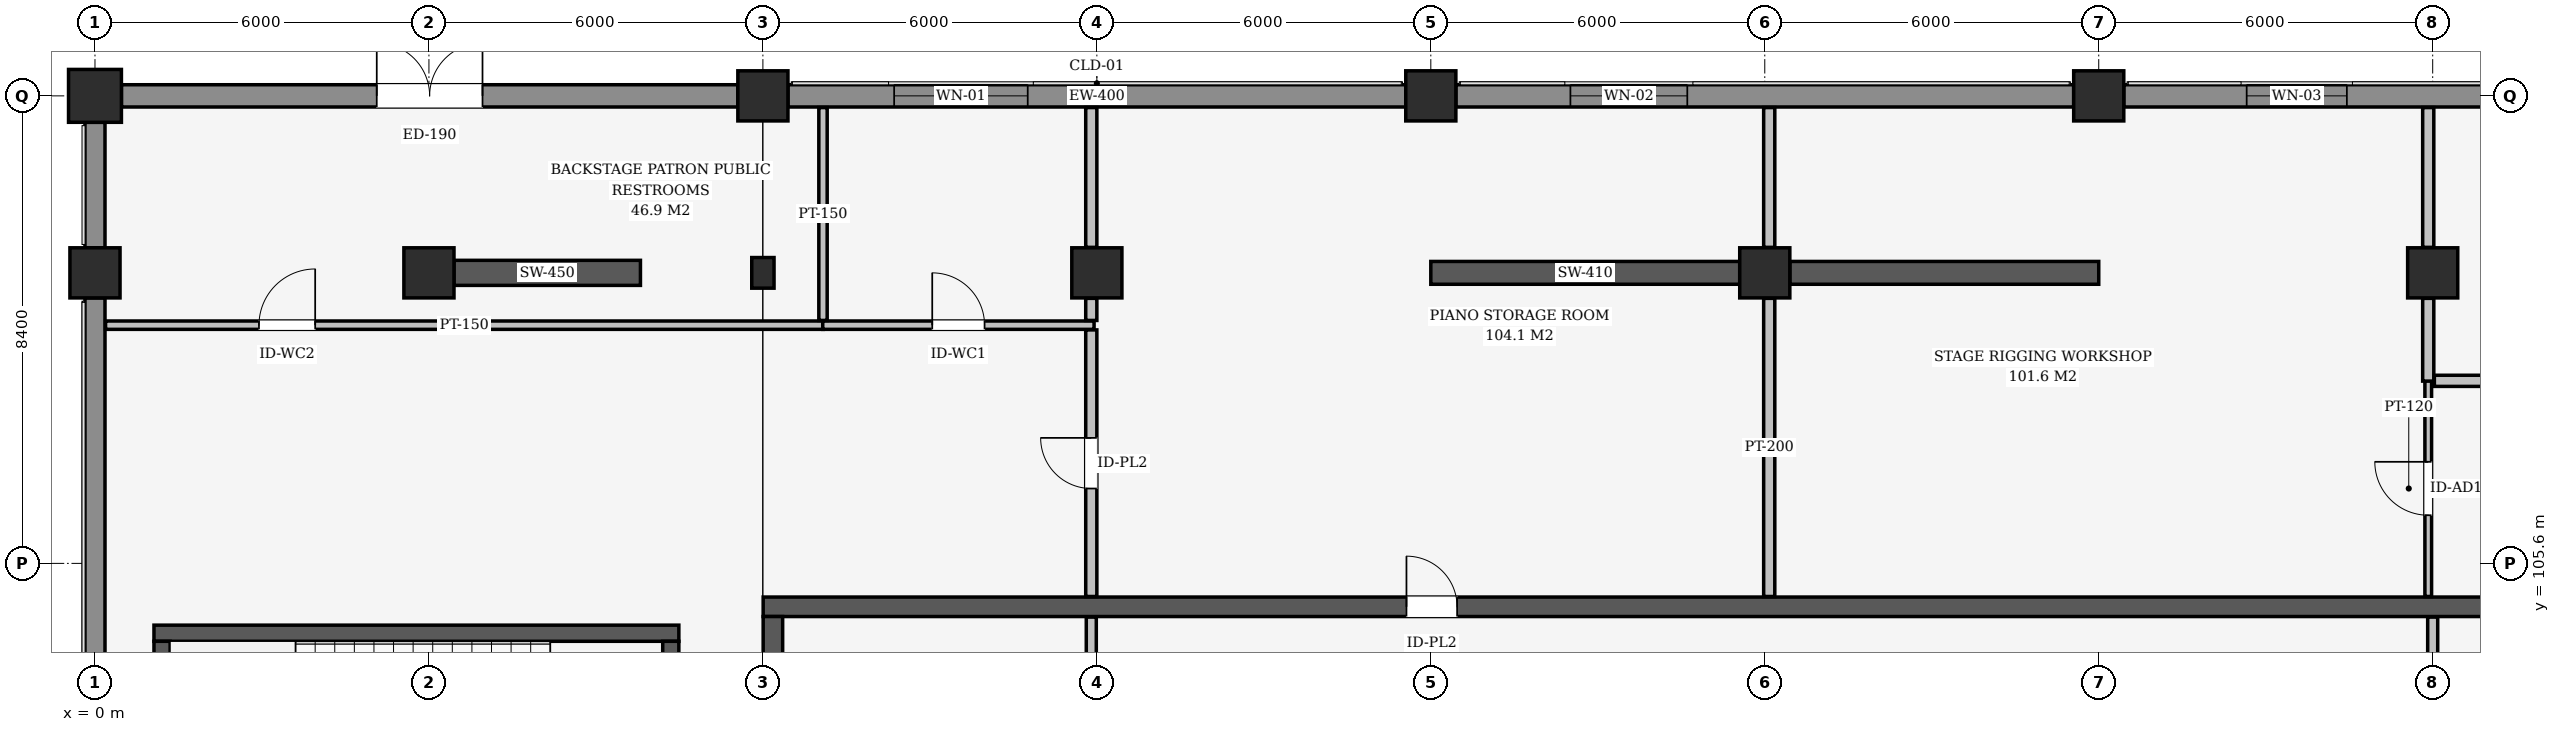
"""IFC4 building model, lengths in metres.
Left out: names, types, materials, properties, quantities, classifications, styles, units other than length and angle.
Written with IfcOpenShell. Run it as: python <this file> out.ifc"""

import sys

from ifc_helpers import new_model, si_unit, direction, frame, frame_2d, origin, origin_2d, place, context, subcontext, project, spatial, rectangle, extrude, element, fill, save


model = new_model("IFC4")
c1 = context("Model", 3, precision=1e-05, world=origin(), true_north=direction((0.0, 1.0)))
c2 = subcontext(c1, "Body", "Model", "MODEL_VIEW")
j1 = project(units=[si_unit("LENGTHUNIT", "METRE"), si_unit("PLANEANGLEUNIT", "RADIAN")], contexts=[c1])
p1 = place(None, origin())
s1 = spatial("IfcSite", under=j1, at=p1, CompositionType="ELEMENT")
p2 = place(p1, origin())
s2 = spatial("IfcBuilding", under=s1, at=p2, CompositionType="ELEMENT")
p3 = place(p2, origin())
s3 = spatial("IfcBuildingStorey", under=s2, at=p3, CompositionType="ELEMENT", Elevation=0.0)
p4 = place(p3, frame((0.0, 114.0, 0.0), z_axis=(0.0, 0.0, 1.0), x_axis=(1.0, 0.0, 0.0)))
e1 = element("IfcColumn", 1, at=p4, inside=s3, PredefinedType="COLUMN", context=c2, shape_type="SweptSolid", body=[
    extrude(rectangle(XDim=0.95, YDim=0.95, at=origin_2d()), origin(), (0.0, 0.0, 1.0), 4.8),
])
for number, where, z_axis, x_axis in (
    (2, (12.0, 114.0, 0.0), (0.0, 0.0, 1.0), (1.0, 0.0, 0.0)),
    (3, (24.0, 114.0, 0.0), (0.0, 0.0, 1.0), (1.0, 0.0, 0.0)),
    (4, (36.0, 114.0, 0.0), (0.0, 0.0, 1.0), (1.0, 0.0, 0.0)),
    (5, (0.0, 110.82, 0.0), (0.0, 0.0, 1.0), (1.0, 0.0, 0.0)),
    (6, (6.0, 110.82, 0.0), (0.0, 0.0, 1.0), (1.0, 0.0, 0.0)),
    (7, (18.0, 110.82, 0.0), (0.0, 0.0, 1.0), (1.0, 0.0, 0.0)),
    (8, (30.0, 110.82, 0.0), (0.0, 0.0, 1.0), (1.0, 0.0, 0.0)),
    (9, (42.0, 110.82, 0.0), (0.0, 0.0, 1.0), (1.0, 0.0, 0.0)),
):
    element("IfcColumn", number, at=place(p3, frame(where, z_axis=z_axis, x_axis=x_axis)), inside=s3, PredefinedType="COLUMN", context=c2, shape_type="SweptSolid", body=[
        extrude(rectangle(XDim=0.9, YDim=0.9, at=origin_2d()), origin(), (0.0, 0.0, 1.0), 4.8),
    ])
p5 = place(p3, frame((12.0, 110.82, 0.0), z_axis=(0.0, 0.0, 1.0), x_axis=(1.0, 0.0, 0.0)))
e10 = element("IfcColumn", 10, at=p5, inside=s3, PredefinedType="PILASTER", context=c2, shape_type="SweptSolid", body=[
    extrude(rectangle(XDim=0.4, YDim=0.55, at=origin_2d()), origin(), (0.0, 0.0, 1.0), 4.8),
])
p6 = place(p3, frame((12.005, 104.82, 0.0), z_axis=(0.0, 0.0, 1.0), x_axis=(1.0, 0.0, 0.0)))
e11 = element("IfcWall", 11, at=p6, inside=s3, PredefinedType="SHEAR", context=c2, shape_type="SweptSolid", body=[
    extrude(rectangle(XDim=35.99, YDim=0.35, at=frame_2d((17.995, 0.0))), origin(), (0.0, 0.0, 1.0), 4.5),
])
p7 = place(p6, frame((11.558, 0.0, 0.0)))
e12 = element("IfcOpeningElement", 12, at=p7, cuts=e11, PredefinedType="OPENING", context=c2, shape_type="SweptSolid", body=[
    extrude(rectangle(XDim=0.91, YDim=2.1, at=frame_2d((0.455, 1.05))), frame((0.0, 0.185, 0.0), z_axis=(0.0, -1.0, 0.0), x_axis=(1.0, 0.0, 0.0)), (0.0, 0.0, 1.0), 0.37),
])
p8 = place(p3, frame((12.18, 74.755, 0.0), z_axis=(0.0, 0.0, 1.0), x_axis=(0.0, 1.0, 0.0)))
e13 = element("IfcWall", 13, at=p8, inside=s3, PredefinedType="SHEAR", context=c2, shape_type="SweptSolid", body=[
    extrude(rectangle(XDim=29.89, YDim=0.35, at=frame_2d((14.945, 0.0))), origin(), (0.0, 0.0, 1.0), 4.5),
])
p9 = place(p3, frame((6.45, 110.82, 0.0), z_axis=(0.0, 0.0, 1.0), x_axis=(1.0, 0.0, 0.0)))
e14 = element("IfcWall", 14, at=p9, inside=s3, PredefinedType="SHEAR", context=c2, shape_type="SweptSolid", body=[
    extrude(rectangle(XDim=3.35, YDim=0.45, at=frame_2d((1.675, 0.0))), origin(), (0.0, 0.0, 1.0), 3.805),
])
for number, where, z_axis, x_axis in (
    (15, (24.0, 110.82, 0.0), (0.0, 0.0, 1.0), (1.0, 0.0, 0.0)),
    (16, (30.45, 110.82, 0.0), (0.0, 0.0, 1.0), (1.0, 0.0, 0.0)),
):
    element("IfcWall", number, at=place(p3, frame(where, z_axis=z_axis, x_axis=x_axis)), inside=s3, PredefinedType="SHEAR", context=c2, shape_type="SweptSolid", body=[
        extrude(rectangle(XDim=5.55, YDim=0.41, at=frame_2d((2.775, 0.0))), origin(), (0.0, 0.0, 1.0), 3.805),
    ])
p10 = place(p3, frame((0.475, 114.0, 0.0), z_axis=(0.0, 0.0, 1.0), x_axis=(1.0, 0.0, 0.0)))
e17 = element("IfcWall", 17, at=p10, inside=s3, PredefinedType="SOLIDWALL", context=c2, shape_type="SweptSolid", body=[
    extrude(rectangle(XDim=11.075, YDim=0.4, at=frame_2d((5.538, 0.0))), origin(), (0.0, 0.0, 1.0), 3.787),
])
p11 = place(p10, frame((4.587, 0.0, 0.0)))
e18 = element("IfcOpeningElement", 18, at=p11, cuts=e17, PredefinedType="OPENING", context=c2, shape_type="SweptSolid", body=[
    extrude(rectangle(XDim=1.9, YDim=2.35, at=frame_2d((0.95, 1.175))), frame((0.0, 0.21, 0.0), z_axis=(0.0, -1.0, 0.0), x_axis=(1.0, 0.0, 0.0)), (0.0, 0.0, 1.0), 0.42),
])
p12 = place(p3, frame((12.45, 114.0, 0.0), z_axis=(0.0, 0.0, 1.0), x_axis=(1.0, 0.0, 0.0)))
e19 = element("IfcWall", 19, at=p12, inside=s3, PredefinedType="SOLIDWALL", context=c2, shape_type="SweptSolid", body=[
    extrude(rectangle(XDim=11.1, YDim=0.4, at=frame_2d((5.55, 0.0))), origin(), (0.0, 0.0, 1.0), 3.787),
])
p13 = place(p12, frame((1.908, 0.0, 0.85)))
e20 = element("IfcOpeningElement", 20, at=p13, cuts=e19, PredefinedType="OPENING", context=c2, shape_type="SweptSolid", body=[
    extrude(rectangle(XDim=2.4, YDim=1.8, at=frame_2d((1.2, 0.9))), frame((0.0, 0.21, 0.0), z_axis=(0.0, -1.0, 0.0), x_axis=(1.0, 0.0, 0.0)), (0.0, 0.0, 1.0), 0.42),
])
p14 = place(p3, frame((24.45, 114.0, 0.0), z_axis=(0.0, 0.0, 1.0), x_axis=(1.0, 0.0, 0.0)))
e21 = element("IfcWall", 21, at=p14, inside=s3, PredefinedType="SOLIDWALL", context=c2, shape_type="SweptSolid", body=[
    extrude(rectangle(XDim=11.1, YDim=0.4, at=frame_2d((5.55, 0.0))), origin(), (0.0, 0.0, 1.0), 3.787),
])
p15 = place(p14, frame((2.058, 0.0, 0.85)))
e22 = element("IfcOpeningElement", 22, at=p15, cuts=e21, PredefinedType="OPENING", context=c2, shape_type="SweptSolid", body=[
    extrude(rectangle(XDim=2.1, YDim=1.8, at=frame_2d((1.05, 0.9))), frame((0.0, 0.21, 0.0), z_axis=(0.0, -1.0, 0.0), x_axis=(1.0, 0.0, 0.0)), (0.0, 0.0, 1.0), 0.42),
])
p16 = place(p3, frame((36.45, 114.0, 0.0), z_axis=(0.0, 0.0, 1.0), x_axis=(1.0, 0.0, 0.0)))
e23 = element("IfcWall", 23, at=p16, inside=s3, PredefinedType="SOLIDWALL", context=c2, shape_type="SweptSolid", body=[
    extrude(rectangle(XDim=11.1, YDim=0.4, at=frame_2d((5.55, 0.0))), origin(), (0.0, 0.0, 1.0), 3.787),
])
p17 = place(p16, frame((2.208, 0.0, 0.85)))
e24 = element("IfcOpeningElement", 24, at=p17, cuts=e23, PredefinedType="OPENING", context=c2, shape_type="SweptSolid", body=[
    extrude(rectangle(XDim=1.8, YDim=1.65, at=frame_2d((0.9, 0.825))), frame((0.0, 0.21, 0.0), z_axis=(0.0, -1.0, 0.0), x_axis=(1.0, 0.0, 0.0)), (0.0, 0.0, 1.0), 0.42),
])
p18 = place(p3, frame((0.0, 97.575, 0.0), z_axis=(0.0, 0.0, 1.0), x_axis=(0.0, 1.0, 0.0)))
e25 = element("IfcWall", 25, at=p18, inside=s3, PredefinedType="SOLIDWALL", context=c2, shape_type="SweptSolid", body=[
    extrude(rectangle(XDim=12.795, YDim=0.36, at=frame_2d((6.397, 0.0))), origin(), (0.0, 0.0, 1.0), 3.869),
])
p19 = place(p18, frame((2.833, 0.0, 0.85)))
e26 = element("IfcOpeningElement", 26, at=p19, cuts=e25, PredefinedType="OPENING", context=c2, shape_type="SweptSolid", body=[
    extrude(rectangle(XDim=1.5, YDim=1.65, at=frame_2d((0.75, 0.825))), frame((0.0, 0.19, 0.0), z_axis=(0.0, -1.0, 0.0), x_axis=(1.0, 0.0, 0.0)), (0.0, 0.0, 1.0), 0.38),
])
p20 = place(p3, frame((0.0, 111.27, 0.0), z_axis=(0.0, 0.0, 1.0), x_axis=(0.0, 1.0, 0.0)))
e27 = element("IfcWall", 27, at=p20, inside=s3, PredefinedType="SOLIDWALL", context=c2, shape_type="SweptSolid", body=[
    extrude(rectangle(XDim=2.255, YDim=0.36, at=frame_2d((1.127, 0.0))), origin(), (0.0, 0.0, 1.0), 3.868),
])
p21 = place(p3, frame((1.06, 104.345, 0.0), z_axis=(0.0, 0.0, 1.0), x_axis=(1.0, 0.0, 0.0)))
e28 = element("IfcWall", 28, at=p21, inside=s3, PredefinedType="SHEAR", context=c2, shape_type="SweptSolid", body=[
    extrude(rectangle(XDim=9.43, YDim=0.29, at=frame_2d((4.715, 0.0))), origin(), (0.0, 0.0, 1.0), 4.5),
])
p22 = place(p3, frame((1.205, 100.01, 0.0), z_axis=(0.0, 0.0, 1.0), x_axis=(0.0, 1.0, 0.0)))
e29 = element("IfcWall", 29, at=p22, inside=s3, PredefinedType="SHEAR", context=c2, shape_type="SweptSolid", body=[
    extrude(rectangle(XDim=4.19, YDim=0.29, at=frame_2d((2.095, 0.0))), origin(), (0.0, 0.0, 1.0), 4.5),
])
p23 = place(p3, frame((10.345, 100.01, 0.0), z_axis=(0.0, 0.0, 1.0), x_axis=(0.0, 1.0, 0.0)))
e30 = element("IfcWall", 30, at=p23, inside=s3, PredefinedType="SHEAR", context=c2, shape_type="SweptSolid", body=[
    extrude(rectangle(XDim=4.19, YDim=0.29, at=frame_2d((2.095, 0.0))), origin(), (0.0, 0.0, 1.0), 4.5),
])
p24 = place(p23, frame((1.52, 0.0, 0.0)))
e31 = element("IfcOpeningElement", 31, at=p24, cuts=e30, PredefinedType="OPENING", context=c2, shape_type="SweptSolid", body=[
    extrude(rectangle(XDim=1.15, YDim=2.15, at=frame_2d((0.575, 1.075))), frame((0.0, 0.155, 0.0), z_axis=(0.0, -1.0, 0.0), x_axis=(1.0, 0.0, 0.0)), (0.0, 0.0, 1.0), 0.31),
])
p25 = place(p3, frame((17.9, 97.25, 0.0), z_axis=(0.0, 0.0, 1.0), x_axis=(0.0, 1.0, 0.0)))
e32 = element("IfcWall", 32, at=p25, inside=s3, PredefinedType="PARTITIONING", context=c2, shape_type="SweptSolid", body=[
    extrude(rectangle(XDim=7.385, YDim=0.18, at=frame_2d((3.692, 0.0))), origin(), (0.0, 0.0, 1.0), 4.8),
])
p26 = place(p25, frame((2.792, 0.0, 0.0)))
e33 = element("IfcOpeningElement", 33, at=p26, cuts=e32, PredefinedType="OPENING", context=c2, shape_type="SweptSolid", body=[
    extrude(rectangle(XDim=1.8, YDim=2.38, at=frame_2d((0.9, 1.19))), frame((0.0, 0.1, 0.0), z_axis=(0.0, -1.0, 0.0), x_axis=(1.0, 0.0, 0.0)), (0.0, 0.0, 1.0), 0.2),
])
p27 = place(p3, frame((42.0, 97.25, 0.0), z_axis=(0.0, 0.0, 1.0), x_axis=(0.0, 1.0, 0.0)))
e34 = element("IfcWall", 34, at=p27, inside=s3, PredefinedType="PARTITIONING", context=c2, shape_type="SweptSolid", body=[
    extrude(rectangle(XDim=7.385, YDim=0.18, at=frame_2d((3.692, 0.0))), origin(), (0.0, 0.0, 1.0), 4.8),
])
p28 = place(p27, frame((2.792, 0.0, 0.0)))
e35 = element("IfcOpeningElement", 35, at=p28, cuts=e34, PredefinedType="OPENING", context=c2, shape_type="SweptSolid", body=[
    extrude(rectangle(XDim=1.8, YDim=2.38, at=frame_2d((0.9, 1.19))), frame((0.0, 0.1, 0.0), z_axis=(0.0, -1.0, 0.0), x_axis=(1.0, 0.0, 0.0)), (0.0, 0.0, 1.0), 0.2),
])
p29 = place(p3, frame((0.19, 109.88, 0.0), z_axis=(0.0, 0.0, 1.0), x_axis=(1.0, 0.0, 0.0)))
e36 = element("IfcWall", 36, at=p29, inside=s3, PredefinedType="PARTITIONING", context=c2, shape_type="SweptSolid", body=[
    extrude(rectangle(XDim=12.895, YDim=0.15, at=frame_2d((6.448, 0.0))), origin(), (0.0, 0.0, 1.0), 4.48),
])
p30 = place(p29, frame((2.756, 0.0, 0.0)))
e37 = element("IfcOpeningElement", 37, at=p30, cuts=e36, PredefinedType="OPENING", context=c2, shape_type="SweptSolid", body=[
    extrude(rectangle(XDim=1.01, YDim=2.1, at=frame_2d((0.505, 1.05))), frame((0.0, 0.085, 0.0), z_axis=(0.0, -1.0, 0.0), x_axis=(1.0, 0.0, 0.0)), (0.0, 0.0, 1.0), 0.17),
])
p31 = place(p3, frame((13.075, 109.88, 0.0), z_axis=(0.0, 0.0, 1.0), x_axis=(1.0, 0.0, 0.0)))
e38 = element("IfcWall", 38, at=p31, inside=s3, PredefinedType="PARTITIONING", context=c2, shape_type="SweptSolid", body=[
    extrude(rectangle(XDim=4.875, YDim=0.15, at=frame_2d((2.438, 0.0))), origin(), (0.0, 0.0, 1.0), 4.48),
])
p32 = place(p31, frame((1.968, 0.0, 0.0)))
e39 = element("IfcOpeningElement", 39, at=p32, cuts=e38, PredefinedType="OPENING", context=c2, shape_type="SweptSolid", body=[
    extrude(rectangle(XDim=0.94, YDim=2.1, at=frame_2d((0.47, 1.05))), frame((0.0, 0.085, 0.0), z_axis=(0.0, -1.0, 0.0), x_axis=(1.0, 0.0, 0.0)), (0.0, 0.0, 1.0), 0.17),
])
p33 = place(p3, frame((17.9, 105.005, 0.0), z_axis=(0.0, 0.0, 1.0), x_axis=(0.0, 1.0, 0.0)))
e40 = element("IfcWall", 40, at=p33, inside=s3, PredefinedType="PARTITIONING", context=c2, shape_type="SweptSolid", body=[
    extrude(rectangle(XDim=4.79, YDim=0.2, at=frame_2d((2.395, 0.0))), origin(), (0.0, 0.0, 1.0), 4.8),
])
p34 = place(p33, frame((1.94, 0.0, 0.0)))
e41 = element("IfcOpeningElement", 41, at=p34, cuts=e40, PredefinedType="OPENING", context=c2, shape_type="SweptSolid", body=[
    extrude(rectangle(XDim=0.91, YDim=2.1, at=frame_2d((0.455, 1.05))), frame((0.0, 0.11, 0.0), z_axis=(0.0, -1.0, 0.0), x_axis=(1.0, 0.0, 0.0)), (0.0, 0.0, 1.0), 0.22),
])
p35 = place(p3, frame((13.08, 109.965, 0.0), z_axis=(0.0, 0.0, 1.0), x_axis=(0.0, 1.0, 0.0)))
e42 = element("IfcWall", 42, at=p35, inside=s3, PredefinedType="PARTITIONING", context=c2, shape_type="SweptSolid", body=[
    extrude(rectangle(XDim=3.825, YDim=0.15, at=frame_2d((1.913, 0.0))), origin(), (0.0, 0.0, 1.0), 4.023),
])
p36 = place(p3, frame((17.9, 109.965, 0.0), z_axis=(0.0, 0.0, 1.0), x_axis=(0.0, 1.0, 0.0)))
e43 = element("IfcWall", 43, at=p36, inside=s3, PredefinedType="PARTITIONING", context=c2, shape_type="SweptSolid", body=[
    extrude(rectangle(XDim=0.397, YDim=0.2, at=frame_2d((0.198, 0.0))), origin(), (0.0, 0.0, 1.0), 4.8),
])
p37 = place(p3, frame((17.9, 111.278, 0.0), z_axis=(0.0, 0.0, 1.0), x_axis=(0.0, 1.0, 0.0)))
e44 = element("IfcWall", 44, at=p37, inside=s3, PredefinedType="PARTITIONING", context=c2, shape_type="SweptSolid", body=[
    extrude(rectangle(XDim=2.512, YDim=0.2, at=frame_2d((1.256, 0.0))), origin(), (0.0, 0.0, 1.0), 4.8),
])
p38 = place(p3, frame((30.08, 105.005, 0.0), z_axis=(0.0, 0.0, 1.0), x_axis=(0.0, 1.0, 0.0)))
e45 = element("IfcWall", 45, at=p38, inside=s3, PredefinedType="PARTITIONING", context=c2, shape_type="SweptSolid", body=[
    extrude(rectangle(XDim=5.357, YDim=0.2, at=frame_2d((2.679, 0.0))), origin(), (0.0, 0.0, 1.0), 4.48),
])
p39 = place(p3, frame((30.08, 111.278, 0.0), z_axis=(0.0, 0.0, 1.0), x_axis=(0.0, 1.0, 0.0)))
e46 = element("IfcWall", 46, at=p39, inside=s3, PredefinedType="PARTITIONING", context=c2, shape_type="SweptSolid", body=[
    extrude(rectangle(XDim=2.512, YDim=0.2, at=frame_2d((1.256, 0.0))), origin(), (0.0, 0.0, 1.0), 4.48),
])
p40 = place(p3, frame((41.92, 105.005, 0.0), z_axis=(0.0, 0.0, 1.0), x_axis=(0.0, 1.0, 0.0)))
e47 = element("IfcWall", 47, at=p40, inside=s3, PredefinedType="PARTITIONING", context=c2, shape_type="SweptSolid", body=[
    extrude(rectangle(XDim=3.88, YDim=0.12, at=frame_2d((1.94, 0.0))), origin(), (0.0, 0.0, 1.0), 4.8),
])
p41 = place(p40, frame((1.46, 0.0, 0.0)))
e48 = element("IfcOpeningElement", 48, at=p41, cuts=e47, PredefinedType="OPENING", context=c2, shape_type="SweptSolid", body=[
    extrude(rectangle(XDim=0.96, YDim=2.16, at=frame_2d((0.48, 1.08))), frame((0.0, 0.07, 0.0), z_axis=(0.0, -1.0, 0.0), x_axis=(1.0, 0.0, 0.0)), (0.0, 0.0, 1.0), 0.14),
])
p42 = place(p3, frame((41.92, 108.875, 0.0), z_axis=(0.0, 0.0, 1.0), x_axis=(0.0, 1.0, 0.0)))
e49 = element("IfcWall", 49, at=p42, inside=s3, PredefinedType="PARTITIONING", context=c2, shape_type="SweptSolid", body=[
    extrude(rectangle(XDim=1.487, YDim=0.2, at=frame_2d((0.744, 0.0))), origin(), (0.0, 0.0, 1.0), 4.8),
])
p43 = place(p3, frame((41.92, 111.278, 0.0), z_axis=(0.0, 0.0, 1.0), x_axis=(0.0, 1.0, 0.0)))
e50 = element("IfcWall", 50, at=p43, inside=s3, PredefinedType="PARTITIONING", context=c2, shape_type="SweptSolid", body=[
    extrude(rectangle(XDim=2.512, YDim=0.2, at=frame_2d((1.256, 0.0))), origin(), (0.0, 0.0, 1.0), 4.8),
])
p44 = place(p3, frame((42.03, 108.88, 0.0), z_axis=(0.0, 0.0, 1.0), x_axis=(1.0, 0.0, 0.0)))
e51 = element("IfcWall", 51, at=p44, inside=s3, PredefinedType="PARTITIONING", context=c2, shape_type="SweptSolid", body=[
    extrude(rectangle(XDim=17.79, YDim=0.2, at=frame_2d((8.895, 0.0))), origin(), (0.0, 0.0, 1.0), 4.48),
])
p45 = place(p44, frame((8.115, 0.0, 0.0)))
e52 = element("IfcOpeningElement", 52, at=p45, cuts=e51, PredefinedType="OPENING", context=c2, shape_type="SweptSolid", body=[
    extrude(rectangle(XDim=1.56, YDim=2.26, at=frame_2d((0.78, 1.13))), frame((0.0, 0.11, 0.0), z_axis=(0.0, -1.0, 0.0), x_axis=(1.0, 0.0, 0.0)), (0.0, 0.0, 1.0), 0.22),
])
p46 = place(p11, origin())
e53 = element("IfcDoor", 53, at=p46, inside=s3, OperationType="DOUBLE_DOOR_SINGLE_SWING", PredefinedType="DOOR", context=c2, shape_type="SweptSolid", body=[
    extrude(rectangle(XDim=1.9, YDim=2.35, at=frame_2d((0.95, 1.175))), frame((0.0, 0.025, 0.0), z_axis=(0.0, -1.0, 0.0), x_axis=(1.0, 0.0, 0.0)), (0.0, 0.0, 1.0), 0.05),
])
fill(e18, e53)
p47 = place(p13, origin())
e54 = element("IfcWindow", 54, at=p47, inside=s3, PartitioningType="SINGLE_PANEL", PredefinedType="WINDOW", context=c2, shape_type="SweptSolid", body=[
    extrude(rectangle(XDim=2.4, YDim=1.8, at=frame_2d((1.2, 0.9))), frame((0.0, 0.03, 0.0), z_axis=(0.0, -1.0, 0.0), x_axis=(1.0, 0.0, 0.0)), (0.0, 0.0, 1.0), 0.06),
])
fill(e20, e54)
p48 = place(p15, origin())
e55 = element("IfcWindow", 55, at=p48, inside=s3, PartitioningType="SINGLE_PANEL", PredefinedType="WINDOW", context=c2, shape_type="SweptSolid", body=[
    extrude(rectangle(XDim=2.1, YDim=1.8, at=frame_2d((1.05, 0.9))), frame((0.0, 0.03, 0.0), z_axis=(0.0, -1.0, 0.0), x_axis=(1.0, 0.0, 0.0)), (0.0, 0.0, 1.0), 0.06),
])
fill(e22, e55)
p49 = place(p17, origin())
e56 = element("IfcWindow", 56, at=p49, inside=s3, PartitioningType="SINGLE_PANEL", PredefinedType="WINDOW", context=c2, shape_type="SweptSolid", body=[
    extrude(rectangle(XDim=1.8, YDim=1.65, at=frame_2d((0.9, 0.825))), frame((0.0, 0.03, 0.0), z_axis=(0.0, -1.0, 0.0), x_axis=(1.0, 0.0, 0.0)), (0.0, 0.0, 1.0), 0.06),
])
fill(e24, e56)
p50 = place(p7, origin())
e57 = element("IfcDoor", 57, at=p50, inside=s3, OperationType="SINGLE_SWING_LEFT", PredefinedType="DOOR", context=c2, shape_type="SweptSolid", body=[
    extrude(rectangle(XDim=0.91, YDim=2.1, at=frame_2d((0.455, 1.05))), frame((0.0, 0.025, 0.0), z_axis=(0.0, -1.0, 0.0), x_axis=(1.0, 0.0, 0.0)), (0.0, 0.0, 1.0), 0.05),
])
fill(e12, e57)
p51 = place(p30, origin())
e58 = element("IfcDoor", 58, at=p51, inside=s3, OperationType="SINGLE_SWING_RIGHT", PredefinedType="DOOR", context=c2, shape_type="SweptSolid", body=[
    extrude(rectangle(XDim=1.01, YDim=2.1, at=frame_2d((0.505, 1.05))), frame((0.0, 0.025, 0.0), z_axis=(0.0, -1.0, 0.0), x_axis=(1.0, 0.0, 0.0)), (0.0, 0.0, 1.0), 0.05),
])
fill(e37, e58)
p52 = place(p32, origin())
e59 = element("IfcDoor", 59, at=p52, inside=s3, OperationType="SINGLE_SWING_LEFT", PredefinedType="DOOR", context=c2, shape_type="SweptSolid", body=[
    extrude(rectangle(XDim=0.94, YDim=2.1, at=frame_2d((0.47, 1.05))), frame((0.0, 0.025, 0.0), z_axis=(0.0, -1.0, 0.0), x_axis=(1.0, 0.0, 0.0)), (0.0, 0.0, 1.0), 0.05),
])
fill(e39, e59)
p53 = place(p34, origin())
e60 = element("IfcDoor", 60, at=p53, inside=s3, OperationType="SINGLE_SWING_RIGHT", PredefinedType="DOOR", context=c2, shape_type="SweptSolid", body=[
    extrude(rectangle(XDim=0.91, YDim=2.1, at=frame_2d((0.455, 1.05))), frame((0.0, 0.025, 0.0), z_axis=(0.0, -1.0, 0.0), x_axis=(1.0, 0.0, 0.0)), (0.0, 0.0, 1.0), 0.05),
])
fill(e41, e60)
p54 = place(p41, origin())
e61 = element("IfcDoor", 61, at=p54, inside=s3, OperationType="SINGLE_SWING_RIGHT", PredefinedType="DOOR", context=c2, shape_type="SweptSolid", body=[
    extrude(rectangle(XDim=0.96, YDim=2.16, at=frame_2d((0.48, 1.08))), frame((0.0, 0.025, 0.0), z_axis=(0.0, -1.0, 0.0), x_axis=(1.0, 0.0, 0.0)), (0.0, 0.0, 1.0), 0.05),
])
fill(e48, e61)
save(model, sys.argv[1])
